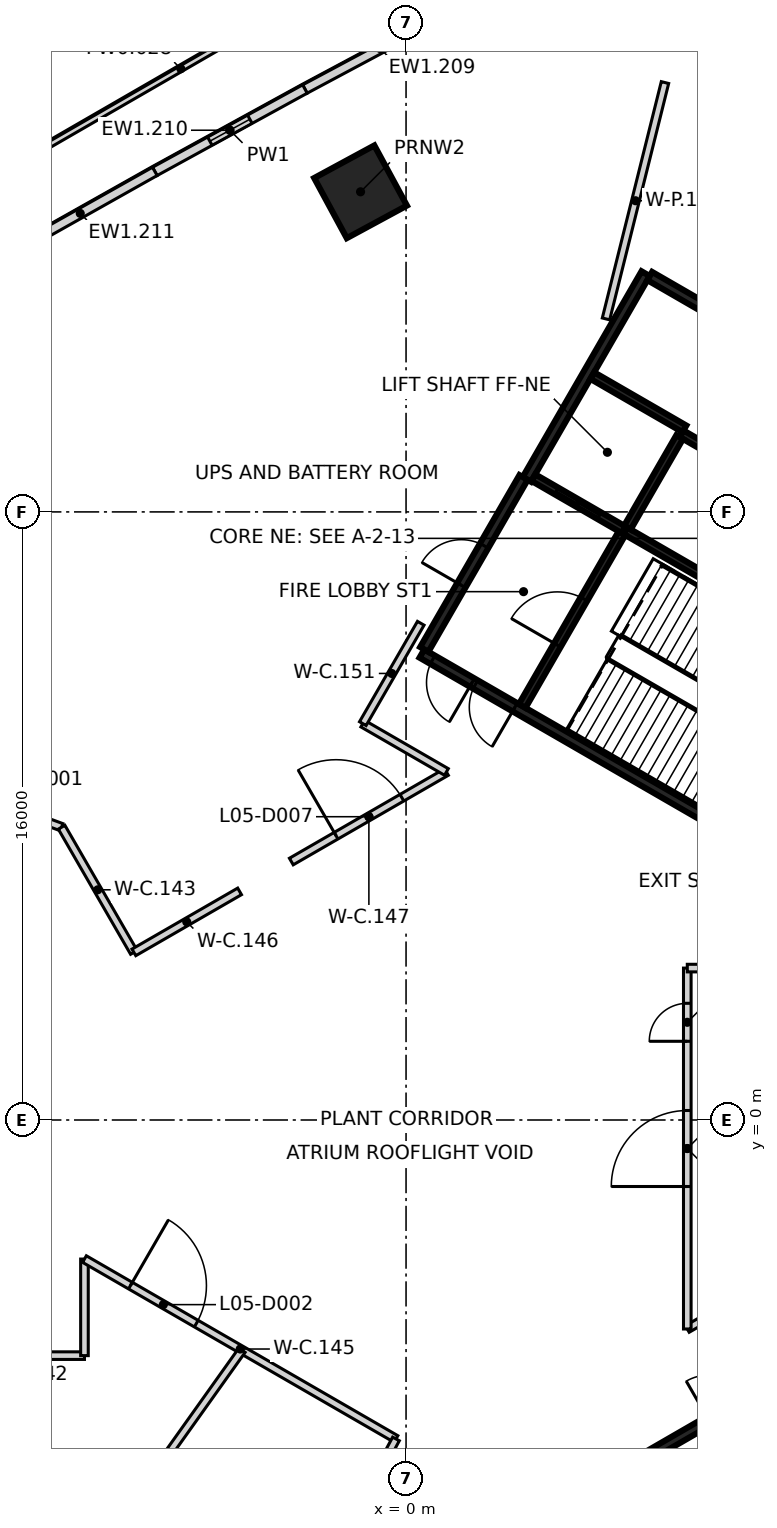
"""IFC4 building model, lengths in metres.
Left out: names, types, materials, properties, quantities, classifications, styles, units other than length and angle.
Written with IfcOpenShell. Run it as: python <this file> out.ifc"""

import sys

from ifc_helpers import new_model, si_unit, direction, frame, frame_2d, origin, origin_2d, place, context, subcontext, project, spatial, rectangle, extrude, element, fill, save


model = new_model("IFC4")
c1 = context("Model", 3, precision=1e-05, world=origin(), true_north=direction((0.0, 1.0)))
c2 = subcontext(c1, "Body", "Model", "MODEL_VIEW")
j1 = project(units=[si_unit("LENGTHUNIT", "METRE"), si_unit("PLANEANGLEUNIT", "RADIAN")], contexts=[c1])
p1 = place(None, origin())
s1 = spatial("IfcSite", under=j1, at=p1, CompositionType="ELEMENT")
p2 = place(p1, origin())
s2 = spatial("IfcBuilding", under=s1, at=p2, CompositionType="ELEMENT")
p3 = place(p2, frame((0.0, 0.0, 29.5)))
s3 = spatial("IfcBuildingStorey", under=s2, at=p3, CompositionType="ELEMENT", Elevation=29.5)
p4 = place(p3, frame((-1.197, 24.423, -0.4), z_axis=(0.0, 0.0, 1.0), x_axis=(-0.476198301069, 0.879337920289, 0.0)))
e1 = element("IfcColumn", 1, at=p4, inside=s3, PredefinedType="COLUMN", context=c2, shape_type="SweptSolid", body=[
    extrude(rectangle(XDim=1.8, YDim=1.8, at=origin_2d()), origin(), (0.0, 0.0, 1.0), 3.025),
])
p5 = place(p3, frame((-2.662, 27.126, 0.0), z_axis=(0.0, 0.0, 1.0), x_axis=(0.88180770738, 0.471609125448, 0.0)))
e2 = element("IfcWall", 2, at=p5, inside=s3, PredefinedType="SOLIDWALL", context=c2, shape_type="SweptSolid", body=[
    extrude(rectangle(XDim=4.504, YDim=0.25, at=frame_2d((2.252, 0.0))), origin(), (0.0, 0.0, 1.0), 5.025),
])
p6 = place(p3, frame((-6.612, 24.958, 0.0), z_axis=(0.0, 0.0, 1.0), x_axis=(0.876652480285, 0.481124130355, 0.0)))
e3 = element("IfcWall", 3, at=p6, inside=s3, PredefinedType="SOLIDWALL", context=c2, shape_type="SweptSolid", body=[
    extrude(rectangle(XDim=4.507, YDim=0.25, at=frame_2d((2.253, 0.0))), origin(), (0.0, 0.0, 1.0), 5.025),
])
p7 = place(p6, frame((1.653, 0.0, 2.4)))
e4 = element("IfcOpeningElement", 4, at=p7, cuts=e3, PredefinedType="OPENING", context=c2, shape_type="SweptSolid", body=[
    extrude(rectangle(XDim=1.2, YDim=0.9, at=frame_2d((0.6, 0.45))), frame((0.0, 0.135, 0.0), z_axis=(0.0, -1.0, 0.0), x_axis=(1.0, 0.0, 0.0)), (0.0, 0.0, 1.0), 0.27),
])
p8 = place(p3, frame((-10.535, 22.75, 0.0), z_axis=(0.0, 0.0, 1.0), x_axis=(0.871397434976, 0.490577731167, 0.0)))
e5 = element("IfcWall", 5, at=p8, inside=s3, PredefinedType="SOLIDWALL", context=c2, shape_type="SweptSolid", body=[
    extrude(rectangle(XDim=4.504, YDim=0.25, at=frame_2d((2.252, 0.0))), origin(), (0.0, 0.0, 1.0), 5.025),
])
p9 = place(p3, frame((-9.82, 25.411, 0.0), z_axis=(0.0, 0.0, 1.0), x_axis=(0.865868993684, 0.500270812437, 0.0)))
e6 = element("IfcWall", 6, at=p9, inside=s3, PredefinedType="PARAPET", context=c2, shape_type="SweptSolid", body=[
    extrude(rectangle(XDim=8.992, YDim=0.15, at=frame_2d((4.496, 0.0))), origin(), (0.0, 0.0, 1.0), 1.1),
])
p10 = place(p3, frame((10.42, 6.498, 0.0), z_axis=(0.0, 0.0, 1.0), x_axis=(-0.866021906294, 0.500006057782, 0.0)))
e7 = element("IfcWall", 7, at=p10, inside=s3, PredefinedType="SHEAR", context=c2, shape_type="SweptSolid", body=[
    extrude(rectangle(XDim=11.55, YDim=0.25, at=frame_2d((5.775, 0.0))), origin(), (0.0, 0.0, 1.0), 5.025),
])
p11 = place(p10, frame((10.025, 0.0, 0.0)))
e8 = element("IfcOpeningElement", 8, at=p11, cuts=e7, PredefinedType="OPENING", context=c2, shape_type="SweptSolid", body=[
    extrude(rectangle(XDim=1.2, YDim=2.1, at=frame_2d((0.6, 1.05))), frame((0.0, 0.135, 0.0), z_axis=(0.0, -1.0, 0.0), x_axis=(1.0, 0.0, 0.0)), (0.0, 0.0, 1.0), 0.27),
])
p12 = place(p10, frame((8.725, 0.0, 0.0)))
e9 = element("IfcOpeningElement", 9, at=p12, cuts=e7, PredefinedType="OPENING", context=c2, shape_type="SweptSolid", body=[
    extrude(rectangle(XDim=1.2, YDim=2.1, at=frame_2d((0.6, 1.05))), frame((0.0, 0.135, 0.0), z_axis=(0.0, -1.0, 0.0), x_axis=(1.0, 0.0, 0.0)), (0.0, 0.0, 1.0), 0.27),
])
p13 = place(p3, frame((3.179, 16.856, 0.0), z_axis=(0.0, 0.0, 1.0), x_axis=(0.500004234368, 0.866022959057, 0.0)))
e10 = element("IfcWall", 10, at=p13, inside=s3, PredefinedType="SHEAR", context=c2, shape_type="SweptSolid", body=[
    extrude(rectangle(XDim=6.25, YDim=0.25, at=frame_2d((3.125, 0.0))), origin(), (0.0, 0.0, 1.0), 5.025),
])
p14 = place(p3, frame((0.48, 12.381, 0.0), z_axis=(0.0, 0.0, 1.0), x_axis=(0.49999885962, 0.866026062182, 0.0)))
e11 = element("IfcWall", 11, at=p14, inside=s3, PredefinedType="SHEAR", context=c2, shape_type="SweptSolid", body=[
    extrude(rectangle(XDim=5.225, YDim=0.25, at=frame_2d((2.612, 0.0))), origin(), (0.0, 0.0, 1.0), 5.025),
])
p15 = place(p14, frame((1.95, 0.0, 0.0)))
e12 = element("IfcOpeningElement", 12, at=p15, cuts=e11, PredefinedType="OPENING", context=c2, shape_type="SweptSolid", body=[
    extrude(rectangle(XDim=1.2, YDim=2.1, at=frame_2d((0.6, 1.05))), frame((0.0, 0.135, 0.0), z_axis=(0.0, -1.0, 0.0), x_axis=(1.0, 0.0, 0.0)), (0.0, 0.0, 1.0), 0.27),
])
p16 = place(p3, frame((6.413, 22.206, 0.0), z_axis=(0.0, 0.0, 1.0), x_axis=(0.866016279763, -0.500015802937, 0.0)))
e13 = element("IfcWall", 13, at=p16, inside=s3, PredefinedType="SHEAR", context=c2, shape_type="SweptSolid", body=[
    extrude(rectangle(XDim=1.849, YDim=0.25, at=frame_2d((0.925, 0.0))), origin(), (0.0, 0.0, 1.0), 5.025),
])
p17 = place(p3, frame((5.775, 15.502, 0.0), z_axis=(0.0, 0.0, 1.0), x_axis=(0.866020080793, -0.500009219579, 0.0)))
e14 = element("IfcWall", 14, at=p17, inside=s3, PredefinedType="SHEAR", context=c2, shape_type="SweptSolid", body=[
    extrude(rectangle(XDim=5.699, YDim=0.2, at=frame_2d((2.85, 0.0))), origin(), (0.0, 0.0, 1.0), 5.025),
])
p18 = place(p3, frame((12.185, 15.207, 0.0), z_axis=(0.0, 0.0, 1.0), x_axis=(-0.866020080793, 0.500009219579, 0.0)))
e15 = element("IfcWall", 15, at=p18, inside=s3, PredefinedType="SHEAR", context=c2, shape_type="SweptSolid", body=[
    extrude(rectangle(XDim=5.699, YDim=0.2, at=frame_2d((2.85, 0.0))), origin(), (0.0, 0.0, 1.0), 5.025),
])
p19 = place(p18, frame((3.874, 0.0, 0.0)))
e16 = element("IfcOpeningElement", 16, at=p19, cuts=e15, PredefinedType="OPENING", context=c2, shape_type="SweptSolid", body=[
    extrude(rectangle(XDim=0.9, YDim=2.1, at=frame_2d((0.45, 1.05))), frame((0.0, 0.11, 0.0), z_axis=(0.0, -1.0, 0.0), x_axis=(1.0, 0.0, 0.0)), (0.0, 0.0, 1.0), 0.22),
])
p20 = place(p3, frame((3.057, 10.895, 0.0), z_axis=(0.0, 0.0, 1.0), x_axis=(0.499989418164, 0.866031513124, 0.0)))
e17 = element("IfcWall", 17, at=p20, inside=s3, PredefinedType="SHEAR", context=c2, shape_type="SweptSolid", body=[
    extrude(rectangle(XDim=5.251, YDim=0.2, at=frame_2d((2.625, 0.0))), origin(), (0.0, 0.0, 1.0), 5.025),
])
p21 = place(p20, frame((1.849, 0.0, 0.0)))
e18 = element("IfcOpeningElement", 18, at=p21, cuts=e17, PredefinedType="OPENING", context=c2, shape_type="SweptSolid", body=[
    extrude(rectangle(XDim=1.4, YDim=2.1, at=frame_2d((0.7, 1.05))), frame((0.0, 0.11, 0.0), z_axis=(0.0, -1.0, 0.0), x_axis=(1.0, 0.0, 0.0)), (0.0, 0.0, 1.0), 0.22),
])
p22 = place(p3, frame((7.199, 17.97, 0.0), z_axis=(0.0, 0.0, 1.0), x_axis=(-0.499968400327, -0.866043647095, 0.0)))
e19 = element("IfcWall", 19, at=p22, inside=s3, PredefinedType="SHEAR", context=c2, shape_type="SweptSolid", body=[
    extrude(rectangle(XDim=2.75, YDim=0.2, at=frame_2d((1.375, 0.0))), origin(), (0.0, 0.0, 1.0), 5.025),
])
p23 = place(p3, frame((5.725, 15.531, 0.0), z_axis=(0.0, 0.0, 1.0), x_axis=(-0.866037306777, 0.499979382845, 0.0)))
e20 = element("IfcWall", 20, at=p23, inside=s3, PredefinedType="SHEAR", context=c2, shape_type="SweptSolid", body=[
    extrude(rectangle(XDim=2.742, YDim=0.2, at=frame_2d((1.371, 0.0))), origin(), (0.0, 0.0, 1.0), 5.025),
])
p24 = place(p23, frame((0.743, 0.0, 0.0)))
e21 = element("IfcOpeningElement", 21, at=p24, cuts=e20, PredefinedType="OPENING", context=c2, shape_type="SweptSolid", body=[
    extrude(rectangle(XDim=1.3, YDim=2.1, at=frame_2d((0.65, 1.05))), frame((0.0, 0.11, 0.0), z_axis=(0.0, -1.0, 0.0), x_axis=(1.0, 0.0, 0.0)), (0.0, 0.0, 1.0), 0.22),
])
p25 = place(p3, frame((4.901, 19.586, 0.0), z_axis=(0.0, 0.0, 1.0), x_axis=(0.866022890907, -0.500004352405, 0.0)))
e22 = element("IfcWall", 22, at=p25, inside=s3, PredefinedType="SHEAR", context=c2, shape_type="SweptSolid", body=[
    extrude(rectangle(XDim=2.799, YDim=0.2, at=frame_2d((1.399, 0.0))), origin(), (0.0, 0.0, 1.0), 5.025),
])
p26 = place(p3, frame((0.417, -12.273, 0.0), z_axis=(0.0, 0.0, 1.0), x_axis=(0.866021906294, 0.500006057782, 0.0)))
e23 = element("IfcWall", 23, at=p26, inside=s3, PredefinedType="SHEAR", context=c2, shape_type="SweptSolid", body=[
    extrude(rectangle(XDim=11.55, YDim=0.25, at=frame_2d((5.775, 0.0))), origin(), (0.0, 0.0, 1.0), 5.025),
])
p27 = place(p26, frame((10.025, 0.0, 0.0)))
e24 = element("IfcOpeningElement", 24, at=p27, cuts=e23, PredefinedType="OPENING", context=c2, shape_type="SweptSolid", body=[
    extrude(rectangle(XDim=1.2, YDim=2.1, at=frame_2d((0.6, 1.05))), frame((0.0, 0.135, 0.0), z_axis=(0.0, -1.0, 0.0), x_axis=(1.0, 0.0, 0.0)), (0.0, 0.0, 1.0), 0.27),
])
p28 = place(p26, frame((8.725, 0.0, 0.0)))
e25 = element("IfcOpeningElement", 25, at=p28, cuts=e23, PredefinedType="OPENING", context=c2, shape_type="SweptSolid", body=[
    extrude(rectangle(XDim=1.2, YDim=2.1, at=frame_2d((0.6, 1.05))), frame((0.0, 0.135, 0.0), z_axis=(0.0, -1.0, 0.0), x_axis=(1.0, 0.0, 0.0)), (0.0, 0.0, 1.0), 0.27),
])
p29 = place(p3, frame((-15.833, 10.193, 0.0), z_axis=(0.0, 0.0, 1.0), x_axis=(0.938576941318, -0.345070029453, 0.0)))
e26 = element("IfcWall", 26, at=p29, inside=s3, PredefinedType="PARTITIONING", context=c2, shape_type="SweptSolid", body=[
    extrude(rectangle(XDim=7.213, YDim=0.2, at=frame_2d((3.606, 0.0))), origin(), (0.0, 0.0, 1.0), 5.025),
])
p30 = place(p29, frame((2.606, 0.0, 0.0)))
e27 = element("IfcOpeningElement", 27, at=p30, cuts=e26, PredefinedType="OPENING", context=c2, shape_type="SweptSolid", body=[
    extrude(rectangle(XDim=2.0, YDim=2.1, at=frame_2d((1.0, 1.05))), frame((0.0, 0.11, 0.0), z_axis=(0.0, -1.0, 0.0), x_axis=(1.0, 0.0, 0.0)), (0.0, 0.0, 1.0), 0.22),
])
p31 = place(p3, frame((-11.5, -6.2, 0.0), z_axis=(0.0, 0.0, 1.0), x_axis=(1.0, 0.0, 0.0)))
e28 = element("IfcWall", 28, at=p31, inside=s3, PredefinedType="PARTITIONING", context=c2, shape_type="SweptSolid", body=[
    extrude(rectangle(XDim=3.038, YDim=0.2, at=frame_2d((1.519, 0.0))), origin(), (0.0, 0.0, 1.0), 5.025),
])
p32 = place(p3, frame((-9.063, 7.704, 0.0), z_axis=(0.0, 0.0, 1.0), x_axis=(0.500039125473, -0.866002813504, 0.0)))
e29 = element("IfcWall", 29, at=p32, inside=s3, PredefinedType="PARTITIONING", context=c2, shape_type="SweptSolid", body=[
    extrude(rectangle(XDim=3.804, YDim=0.2, at=frame_2d((1.902, 0.0))), origin(), (0.0, 0.0, 1.0), 5.025),
])
p33 = place(p3, frame((-8.462, -6.2, 0.0), z_axis=(0.0, 0.0, 1.0), x_axis=(0.0, 1.0, 0.0)))
e30 = element("IfcWall", 30, at=p33, inside=s3, PredefinedType="PARTITIONING", context=c2, shape_type="SweptSolid", body=[
    extrude(rectangle(XDim=2.541, YDim=0.2, at=frame_2d((1.271, 0.0))), origin(), (0.0, 0.0, 1.0), 5.025),
])
p34 = place(p3, frame((-8.462, -3.659, 0.0), z_axis=(0.0, 0.0, 1.0), x_axis=(0.865933840923, -0.500158558005, 0.0)))
e31 = element("IfcWall", 31, at=p34, inside=s3, PredefinedType="PARTITIONING", context=c2, shape_type="SweptSolid", body=[
    extrude(rectangle(XDim=9.465, YDim=0.2, at=frame_2d((4.733, 0.0))), origin(), (0.0, 0.0, 1.0), 5.025),
])
p35 = place(p34, frame((1.397, 0.0, 0.0)))
e32 = element("IfcOpeningElement", 32, at=p35, cuts=e31, PredefinedType="OPENING", context=c2, shape_type="SweptSolid", body=[
    extrude(rectangle(XDim=2.0, YDim=2.1, at=frame_2d((1.0, 1.05))), frame((0.0, 0.11, 0.0), z_axis=(0.0, -1.0, 0.0), x_axis=(1.0, 0.0, 0.0)), (0.0, 0.0, 1.0), 0.22),
])
p36 = place(p3, frame((-7.161, 4.41, 0.0), z_axis=(0.0, 0.0, 1.0), x_axis=(0.866110891935, 0.499851900938, 0.0)))
e33 = element("IfcWall", 33, at=p36, inside=s3, PredefinedType="PARTITIONING", context=c2, shape_type="SweptSolid", body=[
    extrude(rectangle(XDim=3.211, YDim=0.2, at=frame_2d((1.605, 0.0))), origin(), (0.0, 0.0, 1.0), 5.025),
])
p37 = place(p3, frame((-3.019, 6.801, 0.0), z_axis=(0.0, 0.0, 1.0), x_axis=(0.866108818717, 0.499855493259, 0.0)))
e34 = element("IfcWall", 34, at=p37, inside=s3, PredefinedType="PARTITIONING", context=c2, shape_type="SweptSolid", body=[
    extrude(rectangle(XDim=4.713, YDim=0.2, at=frame_2d((2.356, 0.0))), origin(), (0.0, 0.0, 1.0), 5.025),
])
p38 = place(p37, frame((1.36, 0.0, 0.0)))
e35 = element("IfcOpeningElement", 35, at=p38, cuts=e34, PredefinedType="OPENING", context=c2, shape_type="SweptSolid", body=[
    extrude(rectangle(XDim=2.0, YDim=2.1, at=frame_2d((1.0, 1.05))), frame((0.0, 0.11, 0.0), z_axis=(0.0, -1.0, 0.0), x_axis=(1.0, 0.0, 0.0)), (0.0, 0.0, 1.0), 0.22),
])
p39 = place(p3, frame((-2.178, -11.955, 0.0), z_axis=(0.0, 0.0, 1.0), x_axis=(0.473055484912, 0.881032637417, 0.0)))
e36 = element("IfcWall", 36, at=p39, inside=s3, PredefinedType="PARTITIONING", context=c2, shape_type="SweptSolid", body=[
    extrude(rectangle(XDim=4.044, YDim=0.2, at=frame_2d((2.022, 0.0))), origin(), (0.0, 0.0, 1.0), 5.025),
])
p40 = place(p3, frame((-1.138, 10.429, 0.0), z_axis=(0.0, 0.0, 1.0), x_axis=(0.865879872582, -0.500251982761, 0.0)))
e37 = element("IfcWall", 37, at=p40, inside=s3, PredefinedType="PARTITIONING", context=c2, shape_type="SweptSolid", body=[
    extrude(rectangle(XDim=2.541, YDim=0.2, at=frame_2d((1.271, 0.0))), origin(), (0.0, 0.0, 1.0), 5.025),
])
p41 = place(p3, frame((-1.138, 10.429, 0.0), z_axis=(0.0, 0.0, 1.0), x_axis=(0.500013496215, 0.866017611601, 0.0)))
e38 = element("IfcWall", 38, at=p41, inside=s3, PredefinedType="PARTITIONING", context=c2, shape_type="SweptSolid", body=[
    extrude(rectangle(XDim=3.05, YDim=0.2, at=frame_2d((1.525, 0.0))), origin(), (0.0, 0.0, 1.0), 5.025),
])
p42 = place(p3, frame((7.4, -5.499, 0.0), z_axis=(0.0, 0.0, 1.0), x_axis=(0.866070368743, 0.499922110319, 0.0)))
e39 = element("IfcWall", 39, at=p42, inside=s3, PredefinedType="PARTITIONING", context=c2, shape_type="SweptSolid", body=[
    extrude(rectangle(XDim=2.541, YDim=0.2, at=frame_2d((1.27, 0.0))), origin(), (0.0, 0.0, 1.0), 5.025),
])
p43 = place(p3, frame((7.4, -5.499, 0.0), z_axis=(0.0, 0.0, 1.0), x_axis=(0.0, 1.0, 0.0)))
e40 = element("IfcWall", 40, at=p43, inside=s3, PredefinedType="PARTITIONING", context=c2, shape_type="SweptSolid", body=[
    extrude(rectangle(XDim=9.496, YDim=0.2, at=frame_2d((4.748, 0.0))), origin(), (0.0, 0.0, 1.0), 5.025),
])
p44 = place(p43, frame((3.749, 0.0, 0.0)))
e41 = element("IfcOpeningElement", 41, at=p44, cuts=e40, PredefinedType="OPENING", context=c2, shape_type="SweptSolid", body=[
    extrude(rectangle(XDim=2.0, YDim=2.1, at=frame_2d((1.0, 1.05))), frame((0.0, 0.11, 0.0), z_axis=(0.0, -1.0, 0.0), x_axis=(1.0, 0.0, 0.0)), (0.0, 0.0, 1.0), 0.22),
])
p45 = place(p43, frame((7.57, 0.0, 0.0)))
e42 = element("IfcOpeningElement", 42, at=p45, cuts=e40, PredefinedType="OPENING", context=c2, shape_type="SweptSolid", body=[
    extrude(rectangle(XDim=1.0, YDim=2.1, at=frame_2d((0.5, 1.05))), frame((0.0, 0.11, 0.0), z_axis=(0.0, -1.0, 0.0), x_axis=(1.0, 0.0, 0.0)), (0.0, 0.0, 1.0), 0.22),
])
p46 = place(p3, frame((7.4, 3.997, 0.0), z_axis=(0.0, 0.0, 1.0), x_axis=(1.0, 0.0, 0.0)))
e43 = element("IfcWall", 43, at=p46, inside=s3, PredefinedType="PARTITIONING", context=c2, shape_type="SweptSolid", body=[
    extrude(rectangle(XDim=3.743, YDim=0.2, at=frame_2d((1.872, 0.0))), origin(), (0.0, 0.0, 1.0), 5.025),
])
p47 = place(p3, frame((-12.065, -16.93, 0.0), z_axis=(0.0, 0.0, 1.0), x_axis=(0.580338456909, 0.814375389751, 0.0)))
e44 = element("IfcWall", 44, at=p47, inside=s3, PredefinedType="PARTITIONING", context=c2, shape_type="SweptSolid", body=[
    extrude(rectangle(XDim=13.353, YDim=0.2, at=frame_2d((6.676, 0.0))), origin(), (0.0, 0.0, 1.0), 5.025),
])
p48 = place(p3, frame((5.261, 21.078, 0.0), z_axis=(0.0, 0.0, 1.0), x_axis=(0.242123360052, 0.97024547333, 0.0)))
e45 = element("IfcWall", 45, at=p48, inside=s3, PredefinedType="PARTITIONING", context=c2, shape_type="SweptSolid", body=[
    extrude(rectangle(XDim=6.41, YDim=0.2, at=frame_2d((3.205, 0.0))), origin(), (0.0, 0.0, 1.0), 5.025),
])
p49 = place(p7, origin())
e46 = element("IfcWindow", 46, at=p49, inside=s3, PartitioningType="SINGLE_PANEL", PredefinedType="WINDOW", context=c2, shape_type="SweptSolid", body=[
    extrude(rectangle(XDim=1.2, YDim=0.9, at=frame_2d((0.6, 0.45))), frame((0.0, 0.03, 0.0), z_axis=(0.0, -1.0, 0.0), x_axis=(1.0, 0.0, 0.0)), (0.0, 0.0, 1.0), 0.06),
])
fill(e4, e46)
p50 = place(p3, frame((0.0, 0.0, -0.4)))
p51 = place(p50, origin())
p52 = place(p51, frame((0.0, 0.0, 0.35)))
e47 = element("IfcWindow", 47, at=p52, inside=s3, PartitioningType="SINGLE_PANEL", PredefinedType="SKYLIGHT", context=c2, shape_type="SweptSolid", body=[
    extrude(rectangle(XDim=8.72, YDim=5.44, at=origin_2d()), origin(), (0.0, 0.0, 1.0), 0.05),
])
p53 = place(p24, origin())
e48 = element("IfcDoor", 48, at=p53, inside=s3, OperationType="SLIDING_TO_RIGHT", PredefinedType="DOOR", context=c2, shape_type="SweptSolid", body=[
    extrude(rectangle(XDim=1.3, YDim=2.1, at=frame_2d((0.65, 1.05))), frame((0.0, 0.025, 0.0), z_axis=(0.0, -1.0, 0.0), x_axis=(1.0, 0.0, 0.0)), (0.0, 0.0, 1.0), 0.05),
])
fill(e21, e48)
p54 = place(p11, origin())
e49 = element("IfcDoor", 49, at=p54, inside=s3, OperationType="SINGLE_SWING_LEFT", PredefinedType="DOOR", context=c2, shape_type="SweptSolid", body=[
    extrude(rectangle(XDim=1.2, YDim=2.1, at=frame_2d((0.6, 1.05))), frame((0.0, 0.025, 0.0), z_axis=(0.0, -1.0, 0.0), x_axis=(1.0, 0.0, 0.0)), (0.0, 0.0, 1.0), 0.05),
])
fill(e8, e49)
p55 = place(p12, origin())
e50 = element("IfcDoor", 50, at=p55, inside=s3, OperationType="SINGLE_SWING_RIGHT", PredefinedType="DOOR", context=c2, shape_type="SweptSolid", body=[
    extrude(rectangle(XDim=1.2, YDim=2.1, at=frame_2d((0.6, 1.05))), frame((0.0, 0.025, 0.0), z_axis=(0.0, -1.0, 0.0), x_axis=(1.0, 0.0, 0.0)), (0.0, 0.0, 1.0), 0.05),
])
fill(e9, e50)
p56 = place(p21, origin())
e51 = element("IfcDoor", 51, at=p56, inside=s3, OperationType="SINGLE_SWING_RIGHT", PredefinedType="DOOR", context=c2, shape_type="SweptSolid", body=[
    extrude(rectangle(XDim=1.4, YDim=2.1, at=frame_2d((0.7, 1.05))), frame((0.0, 0.025, 0.0), z_axis=(0.0, -1.0, 0.0), x_axis=(1.0, 0.0, 0.0)), (0.0, 0.0, 1.0), 0.05),
])
fill(e18, e51)
p57 = place(p15, origin())
e52 = element("IfcDoor", 52, at=p57, inside=s3, OperationType="SINGLE_SWING_LEFT", PredefinedType="DOOR", context=c2, shape_type="SweptSolid", body=[
    extrude(rectangle(XDim=1.2, YDim=2.1, at=frame_2d((0.6, 1.05))), frame((0.0, 0.025, 0.0), z_axis=(0.0, -1.0, 0.0), x_axis=(1.0, 0.0, 0.0)), (0.0, 0.0, 1.0), 0.05),
])
fill(e12, e52)
p58 = place(p35, frame((2.0, 0.0, 0.0), z_axis=(0.0, 0.0, 1.0), x_axis=(-1.0, 0.0, 0.0)))
e53 = element("IfcDoor", 53, at=p58, inside=s3, OperationType="DOUBLE_DOOR_SINGLE_SWING", PredefinedType="DOOR", context=c2, shape_type="SweptSolid", body=[
    extrude(rectangle(XDim=2.0, YDim=2.1, at=frame_2d((1.0, 1.05))), frame((0.0, 0.025, 0.0), z_axis=(0.0, -1.0, 0.0), x_axis=(1.0, 0.0, 0.0)), (0.0, 0.0, 1.0), 0.05),
])
fill(e32, e53)
p59 = place(p44, frame((2.0, 0.0, 0.0), z_axis=(0.0, 0.0, 1.0), x_axis=(-1.0, 0.0, 0.0)))
e54 = element("IfcDoor", 54, at=p59, inside=s3, OperationType="DOUBLE_DOOR_SINGLE_SWING", PredefinedType="DOOR", context=c2, shape_type="SweptSolid", body=[
    extrude(rectangle(XDim=2.0, YDim=2.1, at=frame_2d((1.0, 1.05))), frame((0.0, 0.025, 0.0), z_axis=(0.0, -1.0, 0.0), x_axis=(1.0, 0.0, 0.0)), (0.0, 0.0, 1.0), 0.05),
])
fill(e41, e54)
p60 = place(p45, frame((1.0, 0.0, 0.0), z_axis=(0.0, 0.0, 1.0), x_axis=(-1.0, 0.0, 0.0)))
e55 = element("IfcDoor", 55, at=p60, inside=s3, OperationType="SINGLE_SWING_LEFT", PredefinedType="DOOR", context=c2, shape_type="SweptSolid", body=[
    extrude(rectangle(XDim=1.0, YDim=2.1, at=frame_2d((0.5, 1.05))), frame((0.0, 0.025, 0.0), z_axis=(0.0, -1.0, 0.0), x_axis=(1.0, 0.0, 0.0)), (0.0, 0.0, 1.0), 0.05),
])
fill(e42, e55)
p61 = place(p38, origin())
e56 = element("IfcDoor", 56, at=p61, inside=s3, OperationType="DOUBLE_DOOR_SINGLE_SWING", PredefinedType="DOOR", context=c2, shape_type="SweptSolid", body=[
    extrude(rectangle(XDim=2.0, YDim=2.1, at=frame_2d((1.0, 1.05))), frame((0.0, 0.025, 0.0), z_axis=(0.0, -1.0, 0.0), x_axis=(1.0, 0.0, 0.0)), (0.0, 0.0, 1.0), 0.05),
])
fill(e35, e56)
save(model, sys.argv[1])
